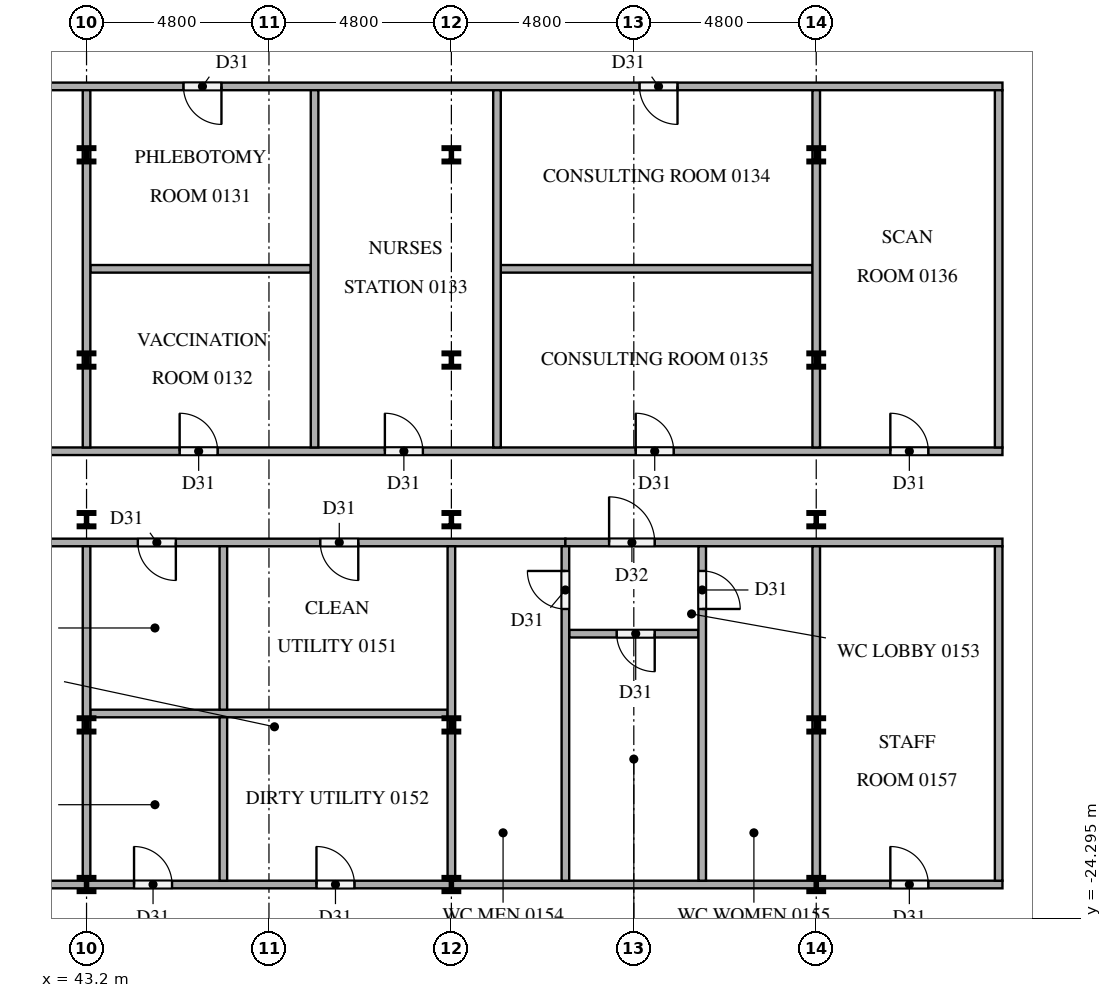
"""IFC4 building model, lengths in metres.
Left out: names, types, materials, properties, quantities, classifications, styles, units other than length and angle.
Written with IfcOpenShell. Run it as: python <this file> out.ifc"""

import sys

from ifc_helpers import new_model, si_unit, direction, frame, frame_2d, origin, origin_2d, place, context, subcontext, project, spatial, rectangle, i_section, extrude, element, fill, save


model = new_model("IFC4")
c1 = context("Model", 3, precision=1e-05, world=origin(), true_north=direction((0.0, 1.0)))
c2 = subcontext(c1, "Body", "Model", "MODEL_VIEW")
j1 = project(units=[si_unit("LENGTHUNIT", "METRE"), si_unit("PLANEANGLEUNIT", "RADIAN")], contexts=[c1])
p1 = place(None, origin())
s1 = spatial("IfcSite", under=j1, at=p1, CompositionType="ELEMENT")
p2 = place(p1, origin())
s2 = spatial("IfcBuilding", under=s1, at=p2, CompositionType="ELEMENT")
p3 = place(p2, frame((0.0, 0.0, 6.0)))
s3 = spatial("IfcBuildingStorey", under=s2, at=p3, CompositionType="ELEMENT", Elevation=6.0)
for number, where, z_axis, x_axis in (
    (1, (43.2, -23.4, 0.0), (0.0, 0.0, 1.0), (1.0, 0.0, 0.0)),
    (2, (43.2, -19.2, 0.0), (0.0, 0.0, 1.0), (1.0, 0.0, 0.0)),
    (3, (43.2, -13.8, 0.0), (0.0, 0.0, 1.0), (1.0, 0.0, 0.0)),
    (4, (43.2, -9.6, 0.0), (0.0, 0.0, 1.0), (1.0, 0.0, 0.0)),
    (5, (43.2, -4.2, 0.0), (0.0, 0.0, 1.0), (1.0, 0.0, 0.0)),
    (6, (52.8, -23.4, 0.0), (0.0, 0.0, 1.0), (1.0, 0.0, 0.0)),
    (7, (52.8, -19.2, 0.0), (0.0, 0.0, 1.0), (1.0, 0.0, 0.0)),
    (8, (52.8, -13.8, 0.0), (0.0, 0.0, 1.0), (1.0, 0.0, 0.0)),
    (9, (52.8, -9.6, 0.0), (0.0, 0.0, 1.0), (1.0, 0.0, 0.0)),
    (10, (52.8, -4.2, 0.0), (0.0, 0.0, 1.0), (1.0, 0.0, 0.0)),
    (11, (62.4, -23.4, 0.0), (0.0, 0.0, 1.0), (1.0, 0.0, 0.0)),
    (12, (62.4, -19.2, 0.0), (0.0, 0.0, 1.0), (1.0, 0.0, 0.0)),
    (13, (62.4, -13.8, 0.0), (0.0, 0.0, 1.0), (1.0, 0.0, 0.0)),
    (14, (62.4, -9.6, 0.0), (0.0, 0.0, 1.0), (1.0, 0.0, 0.0)),
    (15, (62.4, -4.2, 0.0), (0.0, 0.0, 1.0), (1.0, 0.0, 0.0)),
):
    element("IfcColumn", number, at=place(p3, frame(where, z_axis=z_axis, x_axis=x_axis)), inside=s3, PredefinedType="COLUMN", context=c2, shape_type="SweptSolid", body=[
        extrude(i_section(OverallWidth=0.396, OverallDepth=0.381, WebThickness=0.019, FlangeThickness=0.03, at=origin_2d()), origin(), (0.0, 0.0, 1.0), 4.2),
    ])
p4 = place(p3, frame((33.5, -23.4, 0.0), z_axis=(0.0, 0.0, 1.0), x_axis=(1.0, 0.0, 0.0)))
e16 = element("IfcWall", 16, at=p4, inside=s3, PredefinedType="PARTITIONING", context=c2, shape_type="SweptSolid", body=[
    extrude(rectangle(XDim=33.8, YDim=0.2, at=frame_2d((16.9, 0.0))), origin(), (0.0, 0.0, 1.0), 4.2),
])
p5 = place(p4, frame((10.95, 0.0, 0.0)))
e17 = element("IfcOpeningElement", 17, at=p5, cuts=e16, PredefinedType="OPENING", context=c2, shape_type="SweptSolid", body=[
    extrude(rectangle(XDim=1.0, YDim=2.1, at=frame_2d((0.5, 1.05))), frame((0.0, 0.11, 0.0), z_axis=(0.0, -1.0, 0.0), x_axis=(1.0, 0.0, 0.0)), (0.0, 0.0, 1.0), 0.22),
])
p6 = place(p4, frame((15.75, 0.0, 0.0)))
e18 = element("IfcOpeningElement", 18, at=p6, cuts=e16, PredefinedType="OPENING", context=c2, shape_type="SweptSolid", body=[
    extrude(rectangle(XDim=1.0, YDim=2.1, at=frame_2d((0.5, 1.05))), frame((0.0, 0.11, 0.0), z_axis=(0.0, -1.0, 0.0), x_axis=(1.0, 0.0, 0.0)), (0.0, 0.0, 1.0), 0.22),
])
p7 = place(p4, frame((30.85, 0.0, 0.0)))
e19 = element("IfcOpeningElement", 19, at=p7, cuts=e16, PredefinedType="OPENING", context=c2, shape_type="SweptSolid", body=[
    extrude(rectangle(XDim=1.0, YDim=2.1, at=frame_2d((0.5, 1.05))), frame((0.0, 0.11, 0.0), z_axis=(0.0, -1.0, 0.0), x_axis=(1.0, 0.0, 0.0)), (0.0, 0.0, 1.0), 0.22),
])
p8 = place(p3, frame((43.3, -18.9, 0.0), z_axis=(0.0, 0.0, 1.0), x_axis=(1.0, 0.0, 0.0)))
e20 = element("IfcWall", 20, at=p8, inside=s3, PredefinedType="PARTITIONING", context=c2, shape_type="SweptSolid", body=[
    extrude(rectangle(XDim=9.4, YDim=0.2, at=frame_2d((4.7, 0.0))), origin(), (0.0, 0.0, 1.0), 4.2),
])
p9 = place(p3, frame((59.3, -16.8, 0.0), z_axis=(0.0, 0.0, 1.0), x_axis=(-1.0, 0.0, 0.0)))
e21 = element("IfcWall", 21, at=p9, inside=s3, PredefinedType="PARTITIONING", context=c2, shape_type="SweptSolid", body=[
    extrude(rectangle(XDim=3.4, YDim=0.2, at=frame_2d((1.7, 0.0))), origin(), (0.0, 0.0, 1.0), 4.2),
])
p10 = place(p9, frame((1.15, 0.0, 0.0)))
e22 = element("IfcOpeningElement", 22, at=p10, cuts=e21, PredefinedType="OPENING", context=c2, shape_type="SweptSolid", body=[
    extrude(rectangle(XDim=1.0, YDim=2.1, at=frame_2d((0.5, 1.05))), frame((0.0, 0.11, 0.0), z_axis=(0.0, -1.0, 0.0), x_axis=(1.0, 0.0, 0.0)), (0.0, 0.0, 1.0), 0.22),
])
p11 = place(p3, frame((55.8, -14.4, 0.0), z_axis=(0.0, 0.0, 1.0), x_axis=(-1.0, 0.0, 0.0)))
e23 = element("IfcWall", 23, at=p11, inside=s3, PredefinedType="PARTITIONING", context=c2, shape_type="SweptSolid", body=[
    extrude(rectangle(XDim=22.3, YDim=0.2, at=frame_2d((11.15, 0.0))), origin(), (0.0, 0.0, 1.0), 4.2),
])
p12 = place(p11, frame((16.95, 0.0, 0.0)))
e24 = element("IfcOpeningElement", 24, at=p12, cuts=e23, PredefinedType="OPENING", context=c2, shape_type="SweptSolid", body=[
    extrude(rectangle(XDim=1.0, YDim=2.1, at=frame_2d((0.5, 1.05))), frame((0.0, 0.11, 0.0), z_axis=(0.0, -1.0, 0.0), x_axis=(1.0, 0.0, 0.0)), (0.0, 0.0, 1.0), 0.22),
])
p13 = place(p11, frame((10.25, 0.0, 0.0)))
e25 = element("IfcOpeningElement", 25, at=p13, cuts=e23, PredefinedType="OPENING", context=c2, shape_type="SweptSolid", body=[
    extrude(rectangle(XDim=1.0, YDim=2.1, at=frame_2d((0.5, 1.05))), frame((0.0, 0.11, 0.0), z_axis=(0.0, -1.0, 0.0), x_axis=(1.0, 0.0, 0.0)), (0.0, 0.0, 1.0), 0.22),
])
p14 = place(p11, frame((5.45, 0.0, 0.0)))
e26 = element("IfcOpeningElement", 26, at=p14, cuts=e23, PredefinedType="OPENING", context=c2, shape_type="SweptSolid", body=[
    extrude(rectangle(XDim=1.0, YDim=2.1, at=frame_2d((0.5, 1.05))), frame((0.0, 0.11, 0.0), z_axis=(0.0, -1.0, 0.0), x_axis=(1.0, 0.0, 0.0)), (0.0, 0.0, 1.0), 0.22),
])
p15 = place(p3, frame((55.8, -14.4, 0.0), z_axis=(0.0, 0.0, 1.0), x_axis=(1.0, 0.0, 0.0)))
e27 = element("IfcWall", 27, at=p15, inside=s3, PredefinedType="PARTITIONING", context=c2, shape_type="SweptSolid", body=[
    extrude(rectangle(XDim=11.5, YDim=0.2, at=frame_2d((5.75, 0.0))), origin(), (0.0, 0.0, 1.0), 4.2),
])
p16 = place(p15, frame((1.15, 0.0, 0.0)))
e28 = element("IfcOpeningElement", 28, at=p16, cuts=e27, PredefinedType="OPENING", context=c2, shape_type="SweptSolid", body=[
    extrude(rectangle(XDim=1.2, YDim=2.1, at=frame_2d((0.6, 1.05))), frame((0.0, 0.11, 0.0), z_axis=(0.0, -1.0, 0.0), x_axis=(1.0, 0.0, 0.0)), (0.0, 0.0, 1.0), 0.22),
])
p17 = place(p3, frame((33.5, -12.0, 0.0), z_axis=(0.0, 0.0, 1.0), x_axis=(1.0, 0.0, 0.0)))
e29 = element("IfcWall", 29, at=p17, inside=s3, PredefinedType="PARTITIONING", context=c2, shape_type="SweptSolid", body=[
    extrude(rectangle(XDim=33.8, YDim=0.2, at=frame_2d((16.9, 0.0))), origin(), (0.0, 0.0, 1.0), 4.2),
])
p18 = place(p17, frame((12.15, 0.0, 0.0)))
e30 = element("IfcOpeningElement", 30, at=p18, cuts=e29, PredefinedType="OPENING", context=c2, shape_type="SweptSolid", body=[
    extrude(rectangle(XDim=1.0, YDim=2.1, at=frame_2d((0.5, 1.05))), frame((0.0, 0.11, 0.0), z_axis=(0.0, -1.0, 0.0), x_axis=(1.0, 0.0, 0.0)), (0.0, 0.0, 1.0), 0.22),
])
p19 = place(p17, frame((17.55, 0.0, 0.0)))
e31 = element("IfcOpeningElement", 31, at=p19, cuts=e29, PredefinedType="OPENING", context=c2, shape_type="SweptSolid", body=[
    extrude(rectangle(XDim=1.0, YDim=2.1, at=frame_2d((0.5, 1.05))), frame((0.0, 0.11, 0.0), z_axis=(0.0, -1.0, 0.0), x_axis=(1.0, 0.0, 0.0)), (0.0, 0.0, 1.0), 0.22),
])
p20 = place(p17, frame((24.15, 0.0, 0.0)))
e32 = element("IfcOpeningElement", 32, at=p20, cuts=e29, PredefinedType="OPENING", context=c2, shape_type="SweptSolid", body=[
    extrude(rectangle(XDim=1.0, YDim=2.1, at=frame_2d((0.5, 1.05))), frame((0.0, 0.11, 0.0), z_axis=(0.0, -1.0, 0.0), x_axis=(1.0, 0.0, 0.0)), (0.0, 0.0, 1.0), 0.22),
])
p21 = place(p17, frame((30.85, 0.0, 0.0)))
e33 = element("IfcOpeningElement", 33, at=p21, cuts=e29, PredefinedType="OPENING", context=c2, shape_type="SweptSolid", body=[
    extrude(rectangle(XDim=1.0, YDim=2.1, at=frame_2d((0.5, 1.05))), frame((0.0, 0.11, 0.0), z_axis=(0.0, -1.0, 0.0), x_axis=(1.0, 0.0, 0.0)), (0.0, 0.0, 1.0), 0.22),
])
p22 = place(p3, frame((43.3, -7.2, 0.0), z_axis=(0.0, 0.0, 1.0), x_axis=(1.0, 0.0, 0.0)))
e34 = element("IfcWall", 34, at=p22, inside=s3, PredefinedType="PARTITIONING", context=c2, shape_type="SweptSolid", body=[
    extrude(rectangle(XDim=5.8, YDim=0.2, at=frame_2d((2.9, 0.0))), origin(), (0.0, 0.0, 1.0), 4.2),
])
p23 = place(p3, frame((54.1, -7.2, 0.0), z_axis=(0.0, 0.0, 1.0), x_axis=(1.0, 0.0, 0.0)))
e35 = element("IfcWall", 35, at=p23, inside=s3, PredefinedType="PARTITIONING", context=c2, shape_type="SweptSolid", body=[
    extrude(rectangle(XDim=8.2, YDim=0.2, at=frame_2d((4.1, 0.0))), origin(), (0.0, 0.0, 1.0), 4.2),
])
p24 = place(p3, frame((67.3, -2.4, 0.0), z_axis=(0.0, 0.0, 1.0), x_axis=(-1.0, 0.0, 0.0)))
e36 = element("IfcWall", 36, at=p24, inside=s3, PredefinedType="PARTITIONING", context=c2, shape_type="SweptSolid", body=[
    extrude(rectangle(XDim=33.8, YDim=0.2, at=frame_2d((16.9, 0.0))), origin(), (0.0, 0.0, 1.0), 4.2),
])
p25 = place(p24, frame((28.05, 0.0, 0.0)))
e37 = element("IfcOpeningElement", 37, at=p25, cuts=e36, PredefinedType="OPENING", context=c2, shape_type="SweptSolid", body=[
    extrude(rectangle(XDim=1.8, YDim=2.1, at=frame_2d((0.9, 1.05))), frame((0.0, 0.11, 0.0), z_axis=(0.0, -1.0, 0.0), x_axis=(1.0, 0.0, 0.0)), (0.0, 0.0, 1.0), 0.22),
])
p26 = place(p24, frame((20.55, 0.0, 0.0)))
e38 = element("IfcOpeningElement", 38, at=p26, cuts=e36, PredefinedType="OPENING", context=c2, shape_type="SweptSolid", body=[
    extrude(rectangle(XDim=1.0, YDim=2.1, at=frame_2d((0.5, 1.05))), frame((0.0, 0.11, 0.0), z_axis=(0.0, -1.0, 0.0), x_axis=(1.0, 0.0, 0.0)), (0.0, 0.0, 1.0), 0.22),
])
p27 = place(p24, frame((8.55, 0.0, 0.0)))
e39 = element("IfcOpeningElement", 39, at=p27, cuts=e36, PredefinedType="OPENING", context=c2, shape_type="SweptSolid", body=[
    extrude(rectangle(XDim=1.0, YDim=2.1, at=frame_2d((0.5, 1.05))), frame((0.0, 0.11, 0.0), z_axis=(0.0, -1.0, 0.0), x_axis=(1.0, 0.0, 0.0)), (0.0, 0.0, 1.0), 0.22),
])
p28 = place(p3, frame((43.2, -23.3, 0.0), z_axis=(0.0, 0.0, 1.0), x_axis=(0.0, 1.0, 0.0)))
e40 = element("IfcWall", 40, at=p28, inside=s3, PredefinedType="PARTITIONING", context=c2, shape_type="SweptSolid", body=[
    extrude(rectangle(XDim=8.8, YDim=0.2, at=frame_2d((4.4, 0.0))), origin(), (0.0, 0.0, 1.0), 4.2),
])
p29 = place(p3, frame((43.2, -11.9, 0.0), z_axis=(0.0, 0.0, 1.0), x_axis=(0.0, 1.0, 0.0)))
e41 = element("IfcWall", 41, at=p29, inside=s3, PredefinedType="PARTITIONING", context=c2, shape_type="SweptSolid", body=[
    extrude(rectangle(XDim=9.4, YDim=0.2, at=frame_2d((4.7, 0.0))), origin(), (0.0, 0.0, 1.0), 4.2),
])
for number, where, z_axis, x_axis in (
    (42, (46.8, -23.3, 0.0), (0.0, 0.0, 1.0), (0.0, 1.0, 0.0)),
    (43, (46.8, -18.8, 0.0), (0.0, 0.0, 1.0), (0.0, 1.0, 0.0)),
):
    element("IfcWall", number, at=place(p3, frame(where, z_axis=z_axis, x_axis=x_axis)), inside=s3, PredefinedType="PARTITIONING", context=c2, shape_type="SweptSolid", body=[
        extrude(rectangle(XDim=4.3, YDim=0.2, at=frame_2d((2.15, 0.0))), origin(), (0.0, 0.0, 1.0), 4.2),
    ])
p30 = place(p3, frame((49.2, -11.9, 0.0), z_axis=(0.0, 0.0, 1.0), x_axis=(0.0, 1.0, 0.0)))
e44 = element("IfcWall", 44, at=p30, inside=s3, PredefinedType="PARTITIONING", context=c2, shape_type="SweptSolid", body=[
    extrude(rectangle(XDim=9.4, YDim=0.2, at=frame_2d((4.7, 0.0))), origin(), (0.0, 0.0, 1.0), 4.2),
])
p31 = place(p3, frame((52.8, -23.3, 0.0), z_axis=(0.0, 0.0, 1.0), x_axis=(0.0, 1.0, 0.0)))
e45 = element("IfcWall", 45, at=p31, inside=s3, PredefinedType="PARTITIONING", context=c2, shape_type="SweptSolid", body=[
    extrude(rectangle(XDim=8.8, YDim=0.2, at=frame_2d((4.4, 0.0))), origin(), (0.0, 0.0, 1.0), 4.2),
])
p32 = place(p3, frame((54.0, -11.9, 0.0), z_axis=(0.0, 0.0, 1.0), x_axis=(0.0, 1.0, 0.0)))
e46 = element("IfcWall", 46, at=p32, inside=s3, PredefinedType="PARTITIONING", context=c2, shape_type="SweptSolid", body=[
    extrude(rectangle(XDim=9.4, YDim=0.2, at=frame_2d((4.7, 0.0))), origin(), (0.0, 0.0, 1.0), 4.2),
])
p33 = place(p3, frame((55.8, -23.3, 0.0), z_axis=(0.0, 0.0, 1.0), x_axis=(0.0, 1.0, 0.0)))
e47 = element("IfcWall", 47, at=p33, inside=s3, PredefinedType="PARTITIONING", context=c2, shape_type="SweptSolid", body=[
    extrude(rectangle(XDim=8.8, YDim=0.2, at=frame_2d((4.4, 0.0))), origin(), (0.0, 0.0, 1.0), 4.2),
])
p34 = place(p33, frame((7.15, 0.0, 0.0)))
e48 = element("IfcOpeningElement", 48, at=p34, cuts=e47, PredefinedType="OPENING", context=c2, shape_type="SweptSolid", body=[
    extrude(rectangle(XDim=1.0, YDim=2.1, at=frame_2d((0.5, 1.05))), frame((0.0, 0.11, 0.0), z_axis=(0.0, -1.0, 0.0), x_axis=(1.0, 0.0, 0.0)), (0.0, 0.0, 1.0), 0.22),
])
p35 = place(p3, frame((59.4, -14.5, 0.0), z_axis=(0.0, 0.0, 1.0), x_axis=(0.0, -1.0, 0.0)))
e49 = element("IfcWall", 49, at=p35, inside=s3, PredefinedType="PARTITIONING", context=c2, shape_type="SweptSolid", body=[
    extrude(rectangle(XDim=8.8, YDim=0.2, at=frame_2d((4.4, 0.0))), origin(), (0.0, 0.0, 1.0), 4.2),
])
p36 = place(p35, frame((0.65, 0.0, 0.0)))
e50 = element("IfcOpeningElement", 50, at=p36, cuts=e49, PredefinedType="OPENING", context=c2, shape_type="SweptSolid", body=[
    extrude(rectangle(XDim=1.0, YDim=2.1, at=frame_2d((0.5, 1.05))), frame((0.0, 0.11, 0.0), z_axis=(0.0, -1.0, 0.0), x_axis=(1.0, 0.0, 0.0)), (0.0, 0.0, 1.0), 0.22),
])
p37 = place(p3, frame((62.4, -23.3, 0.0), z_axis=(0.0, 0.0, 1.0), x_axis=(0.0, 1.0, 0.0)))
e51 = element("IfcWall", 51, at=p37, inside=s3, PredefinedType="PARTITIONING", context=c2, shape_type="SweptSolid", body=[
    extrude(rectangle(XDim=8.8, YDim=0.2, at=frame_2d((4.4, 0.0))), origin(), (0.0, 0.0, 1.0), 4.2),
])
p38 = place(p3, frame((62.4, -11.9, 0.0), z_axis=(0.0, 0.0, 1.0), x_axis=(0.0, 1.0, 0.0)))
e52 = element("IfcWall", 52, at=p38, inside=s3, PredefinedType="PARTITIONING", context=c2, shape_type="SweptSolid", body=[
    extrude(rectangle(XDim=9.4, YDim=0.2, at=frame_2d((4.7, 0.0))), origin(), (0.0, 0.0, 1.0), 4.2),
])
p39 = place(p3, frame((67.2, -23.3, 0.0), z_axis=(0.0, 0.0, 1.0), x_axis=(0.0, 1.0, 0.0)))
e53 = element("IfcWall", 53, at=p39, inside=s3, PredefinedType="PARTITIONING", context=c2, shape_type="SweptSolid", body=[
    extrude(rectangle(XDim=8.8, YDim=0.2, at=frame_2d((4.4, 0.0))), origin(), (0.0, 0.0, 1.0), 4.2),
])
p40 = place(p3, frame((67.2, -11.9, 0.0), z_axis=(0.0, 0.0, 1.0), x_axis=(0.0, 1.0, 0.0)))
e54 = element("IfcWall", 54, at=p40, inside=s3, PredefinedType="PARTITIONING", context=c2, shape_type="SweptSolid", body=[
    extrude(rectangle(XDim=9.4, YDim=0.2, at=frame_2d((4.7, 0.0))), origin(), (0.0, 0.0, 1.0), 4.2),
])
p41 = place(p26, origin())
e55 = element("IfcDoor", 55, at=p41, inside=s3, OperationType="SINGLE_SWING_LEFT", PredefinedType="DOOR", context=c2, shape_type="SweptSolid", body=[
    extrude(rectangle(XDim=1.0, YDim=2.1, at=frame_2d((0.5, 1.05))), frame((0.0, 0.025, 0.0), z_axis=(0.0, -1.0, 0.0), x_axis=(1.0, 0.0, 0.0)), (0.0, 0.0, 1.0), 0.05),
])
fill(e38, e55)
p42 = place(p18, origin())
e56 = element("IfcDoor", 56, at=p42, inside=s3, OperationType="SINGLE_SWING_LEFT", PredefinedType="DOOR", context=c2, shape_type="SweptSolid", body=[
    extrude(rectangle(XDim=1.0, YDim=2.1, at=frame_2d((0.5, 1.05))), frame((0.0, 0.025, 0.0), z_axis=(0.0, -1.0, 0.0), x_axis=(1.0, 0.0, 0.0)), (0.0, 0.0, 1.0), 0.05),
])
fill(e30, e56)
p43 = place(p19, origin())
e57 = element("IfcDoor", 57, at=p43, inside=s3, OperationType="SINGLE_SWING_LEFT", PredefinedType="DOOR", context=c2, shape_type="SweptSolid", body=[
    extrude(rectangle(XDim=1.0, YDim=2.1, at=frame_2d((0.5, 1.05))), frame((0.0, 0.025, 0.0), z_axis=(0.0, -1.0, 0.0), x_axis=(1.0, 0.0, 0.0)), (0.0, 0.0, 1.0), 0.05),
])
fill(e31, e57)
p44 = place(p27, origin())
e58 = element("IfcDoor", 58, at=p44, inside=s3, OperationType="SINGLE_SWING_LEFT", PredefinedType="DOOR", context=c2, shape_type="SweptSolid", body=[
    extrude(rectangle(XDim=1.0, YDim=2.1, at=frame_2d((0.5, 1.05))), frame((0.0, 0.025, 0.0), z_axis=(0.0, -1.0, 0.0), x_axis=(1.0, 0.0, 0.0)), (0.0, 0.0, 1.0), 0.05),
])
fill(e39, e58)
p45 = place(p20, origin())
e59 = element("IfcDoor", 59, at=p45, inside=s3, OperationType="SINGLE_SWING_LEFT", PredefinedType="DOOR", context=c2, shape_type="SweptSolid", body=[
    extrude(rectangle(XDim=1.0, YDim=2.1, at=frame_2d((0.5, 1.05))), frame((0.0, 0.025, 0.0), z_axis=(0.0, -1.0, 0.0), x_axis=(1.0, 0.0, 0.0)), (0.0, 0.0, 1.0), 0.05),
])
fill(e32, e59)
p46 = place(p21, origin())
e60 = element("IfcDoor", 60, at=p46, inside=s3, OperationType="SINGLE_SWING_LEFT", PredefinedType="DOOR", context=c2, shape_type="SweptSolid", body=[
    extrude(rectangle(XDim=1.0, YDim=2.1, at=frame_2d((0.5, 1.05))), frame((0.0, 0.025, 0.0), z_axis=(0.0, -1.0, 0.0), x_axis=(1.0, 0.0, 0.0)), (0.0, 0.0, 1.0), 0.05),
])
fill(e33, e60)
p47 = place(p13, origin())
e61 = element("IfcDoor", 61, at=p47, inside=s3, OperationType="SINGLE_SWING_LEFT", PredefinedType="DOOR", context=c2, shape_type="SweptSolid", body=[
    extrude(rectangle(XDim=1.0, YDim=2.1, at=frame_2d((0.5, 1.05))), frame((0.0, 0.025, 0.0), z_axis=(0.0, -1.0, 0.0), x_axis=(1.0, 0.0, 0.0)), (0.0, 0.0, 1.0), 0.05),
])
fill(e25, e61)
p48 = place(p5, origin())
e62 = element("IfcDoor", 62, at=p48, inside=s3, OperationType="SINGLE_SWING_LEFT", PredefinedType="DOOR", context=c2, shape_type="SweptSolid", body=[
    extrude(rectangle(XDim=1.0, YDim=2.1, at=frame_2d((0.5, 1.05))), frame((0.0, 0.025, 0.0), z_axis=(0.0, -1.0, 0.0), x_axis=(1.0, 0.0, 0.0)), (0.0, 0.0, 1.0), 0.05),
])
fill(e17, e62)
p49 = place(p14, origin())
e63 = element("IfcDoor", 63, at=p49, inside=s3, OperationType="SINGLE_SWING_LEFT", PredefinedType="DOOR", context=c2, shape_type="SweptSolid", body=[
    extrude(rectangle(XDim=1.0, YDim=2.1, at=frame_2d((0.5, 1.05))), frame((0.0, 0.025, 0.0), z_axis=(0.0, -1.0, 0.0), x_axis=(1.0, 0.0, 0.0)), (0.0, 0.0, 1.0), 0.05),
])
fill(e26, e63)
p50 = place(p6, origin())
e64 = element("IfcDoor", 64, at=p50, inside=s3, OperationType="SINGLE_SWING_LEFT", PredefinedType="DOOR", context=c2, shape_type="SweptSolid", body=[
    extrude(rectangle(XDim=1.0, YDim=2.1, at=frame_2d((0.5, 1.05))), frame((0.0, 0.025, 0.0), z_axis=(0.0, -1.0, 0.0), x_axis=(1.0, 0.0, 0.0)), (0.0, 0.0, 1.0), 0.05),
])
fill(e18, e64)
p51 = place(p16, origin())
e65 = element("IfcDoor", 65, at=p51, inside=s3, OperationType="SINGLE_SWING_LEFT", PredefinedType="DOOR", context=c2, shape_type="SweptSolid", body=[
    extrude(rectangle(XDim=1.2, YDim=2.1, at=frame_2d((0.6, 1.05))), frame((0.0, 0.025, 0.0), z_axis=(0.0, -1.0, 0.0), x_axis=(1.0, 0.0, 0.0)), (0.0, 0.0, 1.0), 0.05),
])
fill(e28, e65)
p52 = place(p34, origin())
e66 = element("IfcDoor", 66, at=p52, inside=s3, OperationType="SINGLE_SWING_RIGHT", PredefinedType="DOOR", context=c2, shape_type="SweptSolid", body=[
    extrude(rectangle(XDim=1.0, YDim=2.1, at=frame_2d((0.5, 1.05))), frame((0.0, 0.025, 0.0), z_axis=(0.0, -1.0, 0.0), x_axis=(1.0, 0.0, 0.0)), (0.0, 0.0, 1.0), 0.05),
])
fill(e48, e66)
p53 = place(p36, origin())
e67 = element("IfcDoor", 67, at=p53, inside=s3, OperationType="SINGLE_SWING_RIGHT", PredefinedType="DOOR", context=c2, shape_type="SweptSolid", body=[
    extrude(rectangle(XDim=1.0, YDim=2.1, at=frame_2d((0.5, 1.05))), frame((0.0, 0.025, 0.0), z_axis=(0.0, -1.0, 0.0), x_axis=(1.0, 0.0, 0.0)), (0.0, 0.0, 1.0), 0.05),
])
fill(e50, e67)
p54 = place(p10, origin())
e68 = element("IfcDoor", 68, at=p54, inside=s3, OperationType="SINGLE_SWING_LEFT", PredefinedType="DOOR", context=c2, shape_type="SweptSolid", body=[
    extrude(rectangle(XDim=1.0, YDim=2.1, at=frame_2d((0.5, 1.05))), frame((0.0, 0.025, 0.0), z_axis=(0.0, -1.0, 0.0), x_axis=(1.0, 0.0, 0.0)), (0.0, 0.0, 1.0), 0.05),
])
fill(e22, e68)
p55 = place(p7, origin())
e69 = element("IfcDoor", 69, at=p55, inside=s3, OperationType="SINGLE_SWING_LEFT", PredefinedType="DOOR", context=c2, shape_type="SweptSolid", body=[
    extrude(rectangle(XDim=1.0, YDim=2.1, at=frame_2d((0.5, 1.05))), frame((0.0, 0.025, 0.0), z_axis=(0.0, -1.0, 0.0), x_axis=(1.0, 0.0, 0.0)), (0.0, 0.0, 1.0), 0.05),
])
fill(e19, e69)
save(model, sys.argv[1])
